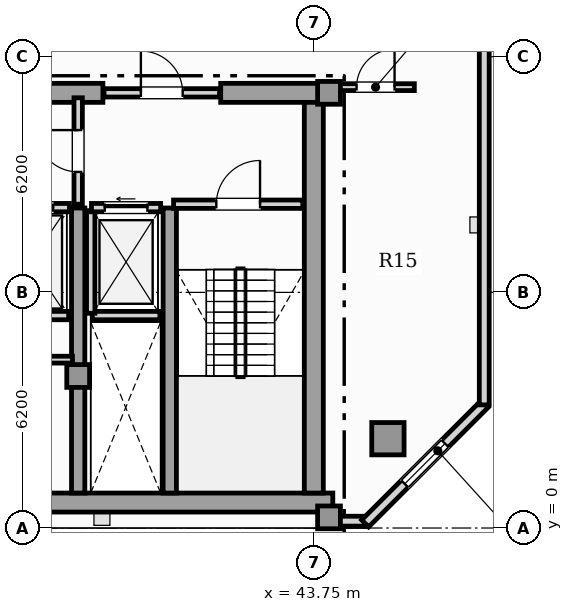
"""IFC4 building model, lengths in metres.
Left out: names, types, materials, properties, quantities, classifications, styles, units other than length and angle.
Written with IfcOpenShell. Run it as: python <this file> out.ifc"""

import sys

from ifc_helpers import new_model, si_unit, direction, frame, frame_2d, origin, origin_2d, place, context, subcontext, project, spatial, rectangle, hollow_rectangle, extrude, element, fill, save


model = new_model("IFC4")
c1 = context("Model", 3, precision=1e-05, world=origin(), true_north=direction((0.0, 1.0)))
c2 = subcontext(c1, "Body", "Model", "MODEL_VIEW")
j1 = project(units=[si_unit("LENGTHUNIT", "METRE"), si_unit("PLANEANGLEUNIT", "RADIAN")], contexts=[c1])
p1 = place(None, origin())
s1 = spatial("IfcSite", under=j1, at=p1, CompositionType="ELEMENT")
p2 = place(p1, origin())
s2 = spatial("IfcBuilding", under=s1, at=p2, CompositionType="ELEMENT")
p3 = place(p2, frame((0.0, 0.0, 324.6)))
s3 = spatial("IfcBuildingStorey", under=s2, at=p3, CompositionType="ELEMENT", Elevation=324.6)
p4 = place(p3, frame((13.25, 0.67, 0.0), z_axis=(0.0, 0.0, 1.0), x_axis=(1.0, 0.0, 0.0)))
e1 = element("IfcWall", 1, at=p4, inside=s3, PredefinedType="SHEAR", context=c2, shape_type="SweptSolid", body=[
    extrude(rectangle(XDim=31.0, YDim=0.5, at=frame_2d((15.5, 0.0))), origin(), (0.0, 0.0, 1.0), 3.65),
])
p5 = place(p3, frame((43.75, 0.92, 0.0), z_axis=(0.0, 0.0, 1.0), x_axis=(0.0, 1.0, 0.0)))
e2 = element("IfcWall", 2, at=p5, inside=s3, PredefinedType="SHEAR", context=c2, shape_type="SweptSolid", body=[
    extrude(rectangle(XDim=10.53, YDim=0.5, at=frame_2d((5.265, 0.0))), origin(), (0.0, 0.0, 1.0), 3.65),
])
p6 = place(p3, frame((30.9, 11.45, 0.0), z_axis=(0.0, 0.0, 1.0), x_axis=(1.0, 0.0, 0.0)))
e3 = element("IfcWall", 3, at=p6, inside=s3, PredefinedType="SHEAR", context=c2, shape_type="SweptSolid", body=[
    extrude(rectangle(XDim=7.3, YDim=0.5, at=frame_2d((3.65, 0.0))), origin(), (0.0, 0.0, 1.0), 3.65),
])
p7 = place(p3, frame((41.3, 11.45, 0.0), z_axis=(0.0, 0.0, 1.0), x_axis=(1.0, 0.0, 0.0)))
e4 = element("IfcWall", 4, at=p7, inside=s3, PredefinedType="SHEAR", context=c2, shape_type="SweptSolid", body=[
    extrude(rectangle(XDim=2.95, YDim=0.5, at=frame_2d((1.475, 0.0))), origin(), (0.0, 0.0, 1.0), 3.65),
])
for number, where, z_axis, x_axis in (
    (5, (37.55, 0.92, 0.0), (0.0, 0.0, 1.0), (0.0, 1.0, 0.0)),
    (6, (39.96, 0.92, 0.0), (0.0, 0.0, 1.0), (0.0, 1.0, 0.0)),
):
    element("IfcWall", number, at=place(p3, frame(where, z_axis=z_axis, x_axis=x_axis)), inside=s3, PredefinedType="SHEAR", context=c2, shape_type="SweptSolid", body=[
        extrude(rectangle(XDim=7.5, YDim=0.35, at=frame_2d((3.75, 0.0))), origin(), (0.0, 0.0, 1.0), 3.65),
    ])
for number, where, z_axis, x_axis in (
    (7, (44.15, 0.28, 0.0), (0.0, 0.0, 1.0), (1.0, 0.0, 0.0)),
    (8, (44.15, 11.45, 0.0), (0.0, 0.0, 1.0), (1.0, 0.0, 0.0)),
    (9, (37.55, 4.0, 0.0), (0.0, 0.0, 1.0), (1.0, 0.0, 0.0)),
):
    element("IfcColumn", number, at=place(p3, frame(where, z_axis=z_axis, x_axis=x_axis)), inside=s3, PredefinedType="COLUMN", context=c2, shape_type="SweptSolid", body=[
        extrude(rectangle(XDim=0.6, YDim=0.6, at=origin_2d()), origin(), (0.0, 0.0, 1.0), 3.85),
    ])
p8 = place(p3, frame((45.7, 2.35, 0.0), z_axis=(0.0, 0.0, 1.0), x_axis=(1.0, 0.0, 0.0)))
e10 = element("IfcColumn", 10, at=p8, inside=s3, PredefinedType="USERDEFINED", context=c2, shape_type="SweptSolid", body=[
    extrude(hollow_rectangle(XDim=0.85, YDim=0.85, WallThickness=0.05, at=origin_2d()), origin(), (0.0, 0.0, 1.0), 3.85),
])
p9 = place(p3, frame((44.25, 0.18, 0.0), z_axis=(0.0, 0.0, 1.0), x_axis=(1.0, 0.0, 0.0)))
e11 = element("IfcWall", 11, at=p9, inside=s3, PredefinedType="SOLIDWALL", context=c2, shape_type="SweptSolid", body=[
    extrude(rectangle(XDim=0.875, YDim=0.26, at=frame_2d((0.438, 0.0))), origin(), (0.0, 0.0, 1.0), 3.65),
])
p10 = place(p3, frame((45.101, 0.12, 0.0), z_axis=(0.0, 0.0, 1.0), x_axis=(0.707079321262, 0.707134240044, 0.0)))
e12 = element("IfcWall", 12, at=p10, inside=s3, PredefinedType="SOLIDWALL", context=c2, shape_type="SweptSolid", body=[
    extrude(rectangle(XDim=4.446, YDim=0.26, at=frame_2d((2.223, 0.0))), origin(), (0.0, 0.0, 1.0), 3.65),
])
p11 = place(p10, frame((1.473, 0.0, 0.9)))
e13 = element("IfcOpeningElement", 13, at=p11, cuts=e12, PredefinedType="OPENING", context=c2, shape_type="SweptSolid", body=[
    extrude(rectangle(XDim=1.5, YDim=1.95, at=frame_2d((0.75, 0.975))), frame((0.0, 0.14, 0.0), z_axis=(0.0, -1.0, 0.0), x_axis=(1.0, 0.0, 0.0)), (0.0, 0.0, 1.0), 0.28),
])
p12 = place(p3, frame((48.235, 3.24, 0.0), z_axis=(0.0, 0.0, 1.0), x_axis=(0.0, 1.0, 0.0)))
e14 = element("IfcWall", 14, at=p12, inside=s3, PredefinedType="SOLIDWALL", context=c2, shape_type="SweptSolid", body=[
    extrude(rectangle(XDim=25.991, YDim=0.26, at=frame_2d((12.995, 0.0))), origin(), (0.0, 0.0, 1.0), 3.65),
])
p13 = place(p12, frame((10.461, 0.0, 0.9)))
e15 = element("IfcOpeningElement", 15, at=p13, cuts=e14, PredefinedType="OPENING", context=c2, shape_type="SweptSolid", body=[
    extrude(rectangle(XDim=1.5, YDim=1.95, at=frame_2d((0.75, 0.975))), frame((0.0, 0.14, 0.0), z_axis=(0.0, -1.0, 0.0), x_axis=(1.0, 0.0, 0.0)), (0.0, 0.0, 1.0), 0.28),
])
p14 = place(p12, frame((12.719, 0.0, 0.9)))
e16 = element("IfcOpeningElement", 16, at=p14, cuts=e14, PredefinedType="OPENING", context=c2, shape_type="SweptSolid", body=[
    extrude(rectangle(XDim=1.5, YDim=1.95, at=frame_2d((0.75, 0.975))), frame((0.0, 0.14, 0.0), z_axis=(0.0, -1.0, 0.0), x_axis=(1.0, 0.0, 0.0)), (0.0, 0.0, 1.0), 0.28),
])
p15 = place(p12, frame((15.247, 0.0, 0.9)))
e17 = element("IfcOpeningElement", 17, at=p15, cuts=e14, PredefinedType="OPENING", context=c2, shape_type="SweptSolid", body=[
    extrude(rectangle(XDim=1.5, YDim=1.95, at=frame_2d((0.75, 0.975))), frame((0.0, 0.14, 0.0), z_axis=(0.0, -1.0, 0.0), x_axis=(1.0, 0.0, 0.0)), (0.0, 0.0, 1.0), 0.28),
])
p16 = place(p12, frame((18.305, 0.0, 0.9)))
e18 = element("IfcOpeningElement", 18, at=p16, cuts=e14, PredefinedType="OPENING", context=c2, shape_type="SweptSolid", body=[
    extrude(rectangle(XDim=1.5, YDim=1.95, at=frame_2d((0.75, 0.975))), frame((0.0, 0.14, 0.0), z_axis=(0.0, -1.0, 0.0), x_axis=(1.0, 0.0, 0.0)), (0.0, 0.0, 1.0), 0.28),
])
p17 = place(p12, frame((21.422, 0.0, 0.9)))
e19 = element("IfcOpeningElement", 19, at=p17, cuts=e14, PredefinedType="OPENING", context=c2, shape_type="SweptSolid", body=[
    extrude(rectangle(XDim=1.5, YDim=1.95, at=frame_2d((0.75, 0.975))), frame((0.0, 0.14, 0.0), z_axis=(0.0, -1.0, 0.0), x_axis=(1.0, 0.0, 0.0)), (0.0, 0.0, 1.0), 0.28),
])
p18 = place(p3, frame((37.92, 5.59, 0.0), z_axis=(0.0, 0.0, 1.0), x_axis=(1.0, 0.0, 0.0)))
e20 = element("IfcWall", 20, at=p18, inside=s3, PredefinedType="SOLIDWALL", context=c2, shape_type="SweptSolid", body=[
    extrude(rectangle(XDim=1.78, YDim=0.22, at=frame_2d((0.89, 0.0))), origin(), (0.0, 0.0, 1.0), 3.65),
])
p19 = place(p3, frame((37.88, 5.65, 0.0), z_axis=(0.0, 0.0, 1.0), x_axis=(0.0, 1.0, 0.0)))
e21 = element("IfcWall", 21, at=p19, inside=s3, PredefinedType="SOLIDWALL", context=c2, shape_type="SweptSolid", body=[
    extrude(rectangle(XDim=2.7, YDim=0.22, at=frame_2d((1.35, 0.0))), origin(), (0.0, 0.0, 1.0), 3.65),
])
p20 = place(p3, frame((37.9, 8.43, 0.0), z_axis=(0.0, 0.0, 1.0), x_axis=(1.0, 0.0, 0.0)))
e22 = element("IfcWall", 22, at=p20, inside=s3, PredefinedType="SOLIDWALL", context=c2, shape_type="SweptSolid", body=[
    extrude(rectangle(XDim=1.82, YDim=0.22, at=frame_2d((0.91, 0.0))), origin(), (0.0, 0.0, 1.0), 3.65),
])
p21 = place(p20, frame((0.35, 0.0, 0.0)))
e23 = element("IfcOpeningElement", 23, at=p21, cuts=e22, PredefinedType="OPENING", context=c2, shape_type="SweptSolid", body=[
    extrude(rectangle(XDim=1.12, YDim=2.25, at=frame_2d((0.56, 1.125))), frame((0.0, 0.12, 0.0), z_axis=(0.0, -1.0, 0.0), x_axis=(1.0, 0.0, 0.0)), (0.0, 0.0, 1.0), 0.24),
])
p22 = place(p3, frame((35.3, 5.59, 0.0), z_axis=(0.0, 0.0, 1.0), x_axis=(1.0, 0.0, 0.0)))
e24 = element("IfcWall", 24, at=p22, inside=s3, PredefinedType="SOLIDWALL", context=c2, shape_type="SweptSolid", body=[
    extrude(rectangle(XDim=2.0, YDim=0.22, at=frame_2d((1.0, 0.0))), origin(), (0.0, 0.0, 1.0), 3.65),
])
p23 = place(p3, frame((35.28, 8.43, 0.0), z_axis=(0.0, 0.0, 1.0), x_axis=(1.0, 0.0, 0.0)))
e25 = element("IfcWall", 25, at=p23, inside=s3, PredefinedType="SOLIDWALL", context=c2, shape_type="SweptSolid", body=[
    extrude(rectangle(XDim=2.04, YDim=0.22, at=frame_2d((1.02, 0.0))), origin(), (0.0, 0.0, 1.0), 3.65),
])
p24 = place(p23, frame((0.43, 0.0, 0.0)))
e26 = element("IfcOpeningElement", 26, at=p24, cuts=e25, PredefinedType="OPENING", context=c2, shape_type="SweptSolid", body=[
    extrude(rectangle(XDim=1.18, YDim=2.2, at=frame_2d((0.59, 1.1))), frame((0.0, 0.12, 0.0), z_axis=(0.0, -1.0, 0.0), x_axis=(1.0, 0.0, 0.0)), (0.0, 0.0, 1.0), 0.24),
])
p25 = place(p3, frame((40.06, 8.52, 0.0), z_axis=(0.0, 0.0, 1.0), x_axis=(1.0, 0.0, 0.0)))
e27 = element("IfcWall", 27, at=p25, inside=s3, PredefinedType="SOLIDWALL", context=c2, shape_type="SweptSolid", body=[
    extrude(rectangle(XDim=3.4, YDim=0.22, at=frame_2d((1.7, 0.0))), origin(), (0.0, 0.0, 1.0), 3.65),
])
p26 = place(p25, frame((1.125, 0.0, 0.0)))
e28 = element("IfcOpeningElement", 28, at=p26, cuts=e27, PredefinedType="OPENING", context=c2, shape_type="SweptSolid", body=[
    extrude(rectangle(XDim=1.15, YDim=2.2, at=frame_2d((0.575, 1.1))), frame((0.0, 0.12, 0.0), z_axis=(0.0, -1.0, 0.0), x_axis=(1.0, 0.0, 0.0)), (0.0, 0.0, 1.0), 0.24),
])
p27 = place(p3, frame((37.55, 8.52, 0.0), z_axis=(0.0, 0.0, 1.0), x_axis=(0.0, 1.0, 0.0)))
e29 = element("IfcWall", 29, at=p27, inside=s3, PredefinedType="SOLIDWALL", context=c2, shape_type="SweptSolid", body=[
    extrude(rectangle(XDim=2.8, YDim=0.22, at=frame_2d((1.4, 0.0))), origin(), (0.0, 0.0, 1.0), 3.105),
])
p28 = place(p27, frame((0.85, 0.0, 0.0)))
e30 = element("IfcOpeningElement", 30, at=p28, cuts=e29, PredefinedType="OPENING", context=c2, shape_type="SweptSolid", body=[
    extrude(rectangle(XDim=1.1, YDim=2.2, at=frame_2d((0.55, 1.1))), frame((0.0, 0.12, 0.0), z_axis=(0.0, -1.0, 0.0), x_axis=(1.0, 0.0, 0.0)), (0.0, 0.0, 1.0), 0.24),
])
p29 = place(p3, frame((38.23, 11.45, 0.0), z_axis=(0.0, 0.0, 1.0), x_axis=(1.0, 0.0, 0.0)))
e31 = element("IfcWall", 31, at=p29, inside=s3, PredefinedType="SOLIDWALL", context=c2, shape_type="SweptSolid", body=[
    extrude(rectangle(XDim=3.04, YDim=0.22, at=frame_2d((1.52, 0.0))), origin(), (0.0, 0.0, 1.0), 3.65),
])
p30 = place(p29, frame((0.97, 0.0, 0.0)))
e32 = element("IfcOpeningElement", 32, at=p30, cuts=e31, PredefinedType="OPENING", context=c2, shape_type="SweptSolid", body=[
    extrude(rectangle(XDim=1.1, YDim=2.2, at=frame_2d((0.55, 1.1))), frame((0.0, 0.12, 0.0), z_axis=(0.0, -1.0, 0.0), x_axis=(1.0, 0.0, 0.0)), (0.0, 0.0, 1.0), 0.24),
])
p31 = place(p3, frame((32.22, 4.43, 0.0), z_axis=(0.0, 0.0, 1.0), x_axis=(1.0, 0.0, 0.0)))
e33 = element("IfcWall", 33, at=p31, inside=s3, PredefinedType="PARTITIONING", context=c2, shape_type="SweptSolid", body=[
    extrude(rectangle(XDim=5.18, YDim=0.18, at=frame_2d((2.59, 0.0))), origin(), (0.0, 0.0, 1.0), 3.65),
])
p32 = place(p3, frame((44.355, 11.6, 0.0), z_axis=(0.0, 0.0, 1.0), x_axis=(1.0, 0.0, 0.0)))
e34 = element("IfcWall", 34, at=p32, inside=s3, PredefinedType="PARTITIONING", context=c2, shape_type="SweptSolid", body=[
    extrude(rectangle(XDim=2.04, YDim=0.18, at=frame_2d((1.02, 0.0))), origin(), (0.0, 0.0, 1.0), 3.65),
])
p33 = place(p32, frame((0.52, 0.0, 0.0)))
e35 = element("IfcOpeningElement", 35, at=p33, cuts=e34, PredefinedType="OPENING", context=c2, shape_type="SweptSolid", body=[
    extrude(rectangle(XDim=1.0, YDim=2.15, at=frame_2d((0.5, 1.075))), frame((0.0, 0.1, 0.0), z_axis=(0.0, -1.0, 0.0), x_axis=(1.0, 0.0, 0.0)), (0.0, 0.0, 1.0), 0.2),
])
p34 = place(p11, origin())
e36 = element("IfcWindow", 36, at=p34, inside=s3, PartitioningType="SINGLE_PANEL", PredefinedType="WINDOW", context=c2, shape_type="SweptSolid", body=[
    extrude(rectangle(XDim=1.5, YDim=1.95, at=frame_2d((0.75, 0.975))), frame((0.0, 0.03, 0.0), z_axis=(0.0, -1.0, 0.0), x_axis=(1.0, 0.0, 0.0)), (0.0, 0.0, 1.0), 0.06),
])
fill(e13, e36)
p35 = place(p21, origin())
e37 = element("IfcDoor", 37, at=p35, inside=s3, OperationType="SLIDING_TO_LEFT", PredefinedType="DOOR", context=c2, shape_type="SweptSolid", body=[
    extrude(rectangle(XDim=1.12, YDim=2.25, at=frame_2d((0.56, 1.125))), frame((0.0, 0.025, 0.0), z_axis=(0.0, -1.0, 0.0), x_axis=(1.0, 0.0, 0.0)), (0.0, 0.0, 1.0), 0.05),
])
fill(e23, e37)
p36 = place(p24, origin())
e38 = element("IfcDoor", 38, at=p36, inside=s3, OperationType="SLIDING_TO_RIGHT", PredefinedType="DOOR", context=c2, shape_type="SweptSolid", body=[
    extrude(rectangle(XDim=1.18, YDim=2.2, at=frame_2d((0.59, 1.1))), frame((0.0, 0.025, 0.0), z_axis=(0.0, -1.0, 0.0), x_axis=(1.0, 0.0, 0.0)), (0.0, 0.0, 1.0), 0.05),
])
fill(e26, e38)
p37 = place(p26, origin())
e39 = element("IfcDoor", 39, at=p37, inside=s3, OperationType="SINGLE_SWING_RIGHT", PredefinedType="DOOR", context=c2, shape_type="SweptSolid", body=[
    extrude(rectangle(XDim=1.15, YDim=2.2, at=frame_2d((0.575, 1.1))), frame((0.0, 0.025, 0.0), z_axis=(0.0, -1.0, 0.0), x_axis=(1.0, 0.0, 0.0)), (0.0, 0.0, 1.0), 0.05),
])
fill(e28, e39)
p38 = place(p28, origin())
e40 = element("IfcDoor", 40, at=p38, inside=s3, OperationType="SINGLE_SWING_RIGHT", PredefinedType="DOOR", context=c2, shape_type="SweptSolid", body=[
    extrude(rectangle(XDim=1.1, YDim=2.2, at=frame_2d((0.55, 1.1))), frame((0.0, 0.025, 0.0), z_axis=(0.0, -1.0, 0.0), x_axis=(1.0, 0.0, 0.0)), (0.0, 0.0, 1.0), 0.05),
])
fill(e30, e40)
p39 = place(p30, origin())
e41 = element("IfcDoor", 41, at=p39, inside=s3, OperationType="SINGLE_SWING_LEFT", PredefinedType="DOOR", context=c2, shape_type="SweptSolid", body=[
    extrude(rectangle(XDim=1.1, YDim=2.2, at=frame_2d((0.55, 1.1))), frame((0.0, 0.025, 0.0), z_axis=(0.0, -1.0, 0.0), x_axis=(1.0, 0.0, 0.0)), (0.0, 0.0, 1.0), 0.05),
])
fill(e32, e41)
p40 = place(p33, origin())
e42 = element("IfcDoor", 42, at=p40, inside=s3, OperationType="SINGLE_SWING_RIGHT", PredefinedType="DOOR", context=c2, shape_type="SweptSolid", body=[
    extrude(rectangle(XDim=1.0, YDim=2.15, at=frame_2d((0.5, 1.075))), frame((0.0, 0.025, 0.0), z_axis=(0.0, -1.0, 0.0), x_axis=(1.0, 0.0, 0.0)), (0.0, 0.0, 1.0), 0.05),
])
fill(e35, e42)
save(model, sys.argv[1])
